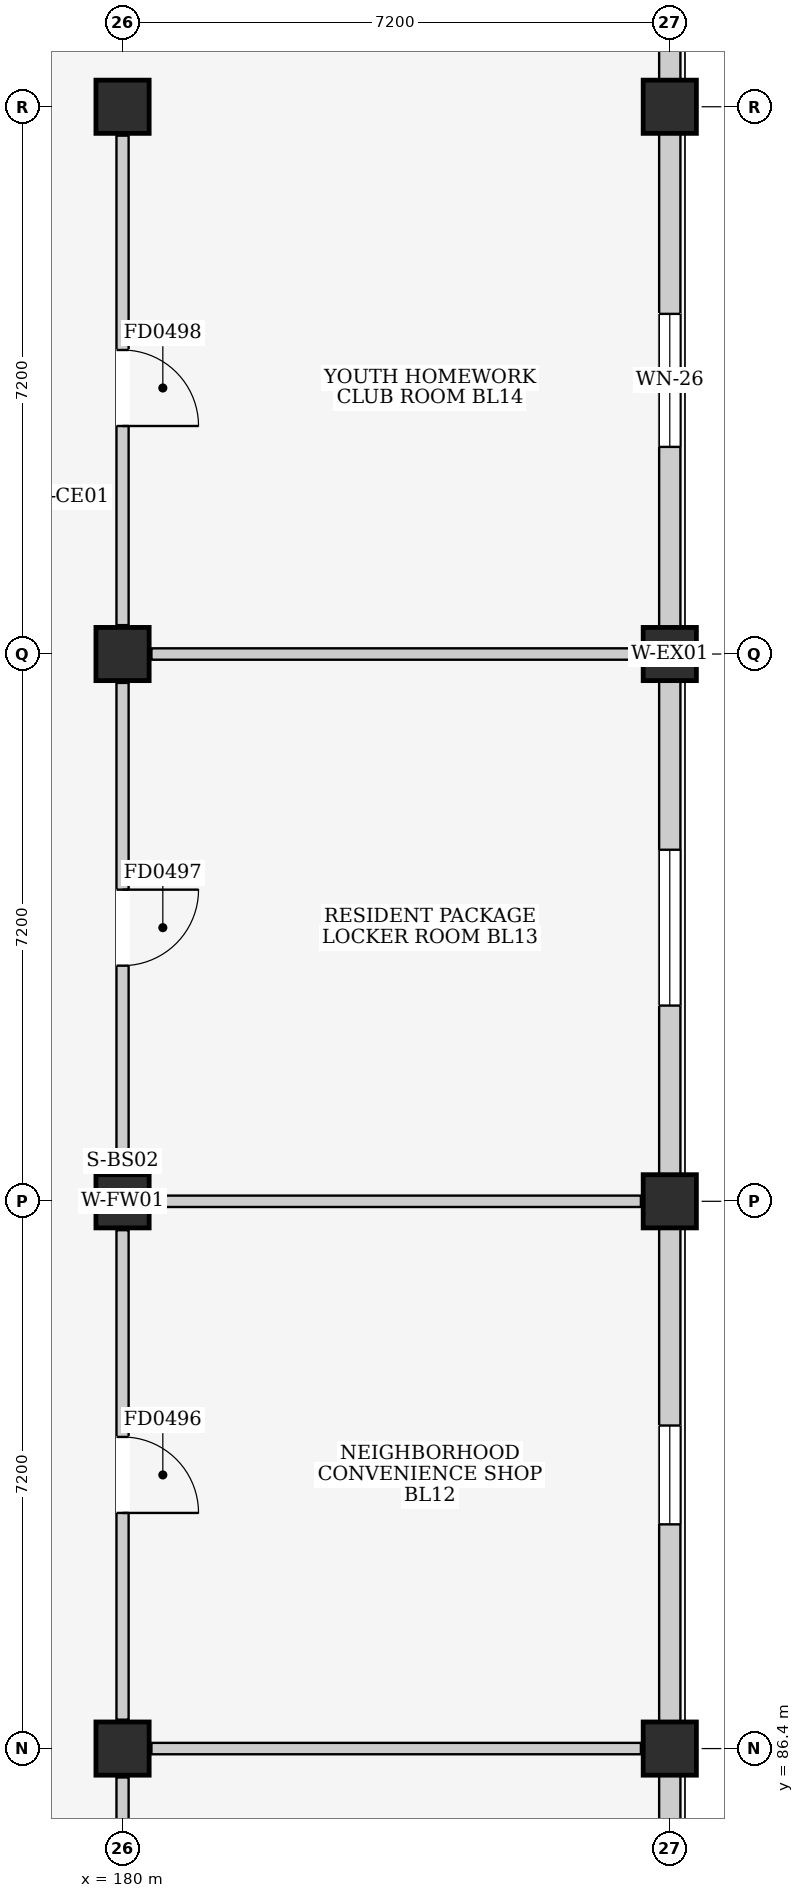
"""IFC4 building model, lengths in metres.
Left out: names, types, materials, properties, quantities, classifications, styles, units other than length and angle.
Written with IfcOpenShell. Run it as: python <this file> out.ifc"""

import sys

from ifc_helpers import new_model, si_unit, direction, frame, frame_2d, origin, origin_2d, place, context, subcontext, project, spatial, rectangle, extrude, element, fill, save


model = new_model("IFC4")
c1 = context("Model", 3, precision=1e-05, world=origin(), true_north=direction((0.0, 1.0)))
c2 = subcontext(c1, "Body", "Model", "MODEL_VIEW")
j1 = project(units=[si_unit("LENGTHUNIT", "METRE"), si_unit("PLANEANGLEUNIT", "RADIAN")], contexts=[c1])
p1 = place(None, origin())
s1 = spatial("IfcSite", under=j1, at=p1, CompositionType="ELEMENT")
p2 = place(p1, origin())
s2 = spatial("IfcBuilding", under=s1, at=p2, CompositionType="ELEMENT")
p3 = place(p2, origin())
s3 = spatial("IfcBuildingStorey", under=s2, at=p3, CompositionType="ELEMENT", Elevation=0.0)
for number, where, z_axis, x_axis in (
    (1, (180.0, 86.4, 0.0), (0.0, 0.0, 1.0), (1.0, 0.0, 0.0)),
    (2, (180.0, 93.6, 0.0), (0.0, 0.0, 1.0), (1.0, 0.0, 0.0)),
    (3, (180.0, 100.8, 0.0), (0.0, 0.0, 1.0), (1.0, 0.0, 0.0)),
    (4, (180.0, 108.0, 0.0), (0.0, 0.0, 1.0), (1.0, 0.0, 0.0)),
    (5, (187.2, 86.4, 0.0), (0.0, 0.0, 1.0), (1.0, 0.0, 0.0)),
    (6, (187.2, 93.6, 0.0), (0.0, 0.0, 1.0), (1.0, 0.0, 0.0)),
    (7, (187.2, 100.8, 0.0), (0.0, 0.0, 1.0), (1.0, 0.0, 0.0)),
    (8, (187.2, 108.0, 0.0), (0.0, 0.0, 1.0), (1.0, 0.0, 0.0)),
):
    element("IfcColumn", number, at=place(p3, frame(where, z_axis=z_axis, x_axis=x_axis)), inside=s3, PredefinedType="COLUMN", context=c2, shape_type="SweptSolid", body=[
        extrude(rectangle(XDim=0.7, YDim=0.7, at=origin_2d()), origin(), (0.0, 0.0, 1.0), 4.5),
    ])
p4 = place(p3, frame((187.2, 79.55, 0.0), z_axis=(0.0, 0.0, 1.0), x_axis=(0.0, 1.0, 0.0)))
e9 = element("IfcWall", 9, at=p4, inside=s3, PredefinedType="ELEMENTEDWALL", context=c2, shape_type="SweptSolid", body=[
    extrude(rectangle(XDim=6.5, YDim=0.28, at=frame_2d((3.25, 0.0))), origin(), (0.0, 0.0, 1.0), 3.665),
])
p5 = place(p4, frame((2.325, 0.0, 0.95)))
e10 = element("IfcOpeningElement", 10, at=p5, cuts=e9, PredefinedType="OPENING", context=c2, shape_type="SweptSolid", body=[
    extrude(rectangle(XDim=1.85, YDim=1.4, at=frame_2d((0.925, 0.7))), frame((0.0, 0.155, 0.0), z_axis=(0.0, -1.0, 0.0), x_axis=(1.0, 0.0, 0.0)), (0.0, 0.0, 1.0), 0.31),
])
p6 = place(p3, frame((187.2, 86.75, 0.0), z_axis=(0.0, 0.0, 1.0), x_axis=(0.0, 1.0, 0.0)))
e11 = element("IfcWall", 11, at=p6, inside=s3, PredefinedType="ELEMENTEDWALL", context=c2, shape_type="SweptSolid", body=[
    extrude(rectangle(XDim=6.5, YDim=0.28, at=frame_2d((3.25, 0.0))), origin(), (0.0, 0.0, 1.0), 3.665),
])
p7 = place(p6, frame((2.6, 0.0, 0.95)))
e12 = element("IfcOpeningElement", 12, at=p7, cuts=e11, PredefinedType="OPENING", context=c2, shape_type="SweptSolid", body=[
    extrude(rectangle(XDim=1.3, YDim=1.25, at=frame_2d((0.65, 0.625))), frame((0.0, 0.155, 0.0), z_axis=(0.0, -1.0, 0.0), x_axis=(1.0, 0.0, 0.0)), (0.0, 0.0, 1.0), 0.31),
])
p8 = place(p3, frame((187.2, 93.95, 0.0), z_axis=(0.0, 0.0, 1.0), x_axis=(0.0, 1.0, 0.0)))
e13 = element("IfcWall", 13, at=p8, inside=s3, PredefinedType="ELEMENTEDWALL", context=c2, shape_type="SweptSolid", body=[
    extrude(rectangle(XDim=6.5, YDim=0.28, at=frame_2d((3.25, 0.0))), origin(), (0.0, 0.0, 1.0), 3.665),
])
p9 = place(p8, frame((2.225, 0.0, 0.95)))
e14 = element("IfcOpeningElement", 14, at=p9, cuts=e13, PredefinedType="OPENING", context=c2, shape_type="SweptSolid", body=[
    extrude(rectangle(XDim=2.05, YDim=1.6, at=frame_2d((1.025, 0.8))), frame((0.0, 0.155, 0.0), z_axis=(0.0, -1.0, 0.0), x_axis=(1.0, 0.0, 0.0)), (0.0, 0.0, 1.0), 0.31),
])
p10 = place(p3, frame((187.2, 101.15, 0.0), z_axis=(0.0, 0.0, 1.0), x_axis=(0.0, 1.0, 0.0)))
e15 = element("IfcWall", 15, at=p10, inside=s3, PredefinedType="ELEMENTEDWALL", context=c2, shape_type="SweptSolid", body=[
    extrude(rectangle(XDim=6.5, YDim=0.28, at=frame_2d((3.25, 0.0))), origin(), (0.0, 0.0, 1.0), 3.665),
])
p11 = place(p10, frame((2.375, 0.0, 0.95)))
e16 = element("IfcOpeningElement", 16, at=p11, cuts=e15, PredefinedType="OPENING", context=c2, shape_type="SweptSolid", body=[
    extrude(rectangle(XDim=1.75, YDim=1.55, at=frame_2d((0.875, 0.775))), frame((0.0, 0.155, 0.0), z_axis=(0.0, -1.0, 0.0), x_axis=(1.0, 0.0, 0.0)), (0.0, 0.0, 1.0), 0.31),
])
p12 = place(p3, frame((187.2, 108.35, 0.0), z_axis=(0.0, 0.0, 1.0), x_axis=(0.0, 1.0, 0.0)))
e17 = element("IfcWall", 17, at=p12, inside=s3, PredefinedType="ELEMENTEDWALL", context=c2, shape_type="SweptSolid", body=[
    extrude(rectangle(XDim=6.5, YDim=0.28, at=frame_2d((3.25, 0.0))), origin(), (0.0, 0.0, 1.0), 3.665),
])
p13 = place(p12, frame((2.35, 0.0, 0.95)))
e18 = element("IfcOpeningElement", 18, at=p13, cuts=e17, PredefinedType="OPENING", context=c2, shape_type="SweptSolid", body=[
    extrude(rectangle(XDim=1.8, YDim=1.5, at=frame_2d((0.9, 0.75))), frame((0.0, 0.155, 0.0), z_axis=(0.0, -1.0, 0.0), x_axis=(1.0, 0.0, 0.0)), (0.0, 0.0, 1.0), 0.31),
])
p14 = place(p3, frame((180.0, 79.58, 0.0), z_axis=(0.0, 0.0, 1.0), x_axis=(0.0, 1.0, 0.0)))
e19 = element("IfcWall", 19, at=p14, inside=s3, PredefinedType="PARTITIONING", context=c2, shape_type="SweptSolid", body=[
    extrude(rectangle(XDim=6.44, YDim=0.16, at=frame_2d((3.22, 0.0))), origin(), (0.0, 0.0, 1.0), 3.435),
])
p15 = place(p14, frame((2.82, 0.0, 0.0)))
e20 = element("IfcOpeningElement", 20, at=p15, cuts=e19, PredefinedType="OPENING", context=c2, shape_type="SweptSolid", body=[
    extrude(rectangle(XDim=1.0, YDim=2.15, at=frame_2d((0.5, 1.075))), frame((0.0, 0.095, 0.0), z_axis=(0.0, -1.0, 0.0), x_axis=(1.0, 0.0, 0.0)), (0.0, 0.0, 1.0), 0.19),
])
p16 = place(p3, frame((180.38, 86.4, 0.0), z_axis=(0.0, 0.0, 1.0), x_axis=(1.0, 0.0, 0.0)))
e21 = element("IfcWall", 21, at=p16, inside=s3, PredefinedType="PARTITIONING", context=c2, shape_type="SweptSolid", body=[
    extrude(rectangle(XDim=6.44, YDim=0.15, at=frame_2d((3.22, 0.0))), origin(), (0.0, 0.0, 1.0), 3.435),
])
p17 = place(p3, frame((180.0, 86.78, 0.0), z_axis=(0.0, 0.0, 1.0), x_axis=(0.0, 1.0, 0.0)))
e22 = element("IfcWall", 22, at=p17, inside=s3, PredefinedType="PARTITIONING", context=c2, shape_type="SweptSolid", body=[
    extrude(rectangle(XDim=6.44, YDim=0.16, at=frame_2d((3.22, 0.0))), origin(), (0.0, 0.0, 1.0), 3.435),
])
p18 = place(p17, frame((2.72, 0.0, 0.0)))
e23 = element("IfcOpeningElement", 23, at=p18, cuts=e22, PredefinedType="OPENING", context=c2, shape_type="SweptSolid", body=[
    extrude(rectangle(XDim=1.0, YDim=2.15, at=frame_2d((0.5, 1.075))), frame((0.0, 0.095, 0.0), z_axis=(0.0, -1.0, 0.0), x_axis=(1.0, 0.0, 0.0)), (0.0, 0.0, 1.0), 0.19),
])
p19 = place(p3, frame((180.38, 93.6, 0.0), z_axis=(0.0, 0.0, 1.0), x_axis=(1.0, 0.0, 0.0)))
e24 = element("IfcWall", 24, at=p19, inside=s3, PredefinedType="PARTITIONING", context=c2, shape_type="SweptSolid", body=[
    extrude(rectangle(XDim=6.44, YDim=0.15, at=frame_2d((3.22, 0.0))), origin(), (0.0, 0.0, 1.0), 3.435),
])
p20 = place(p3, frame((180.0, 93.98, 0.0), z_axis=(0.0, 0.0, 1.0), x_axis=(0.0, 1.0, 0.0)))
e25 = element("IfcWall", 25, at=p20, inside=s3, PredefinedType="PARTITIONING", context=c2, shape_type="SweptSolid", body=[
    extrude(rectangle(XDim=6.44, YDim=0.16, at=frame_2d((3.22, 0.0))), origin(), (0.0, 0.0, 1.0), 3.435),
])
p21 = place(p20, frame((2.72, 0.0, 0.0)))
e26 = element("IfcOpeningElement", 26, at=p21, cuts=e25, PredefinedType="OPENING", context=c2, shape_type="SweptSolid", body=[
    extrude(rectangle(XDim=1.0, YDim=2.15, at=frame_2d((0.5, 1.075))), frame((0.0, 0.095, 0.0), z_axis=(0.0, -1.0, 0.0), x_axis=(1.0, 0.0, 0.0)), (0.0, 0.0, 1.0), 0.19),
])
p22 = place(p3, frame((180.38, 100.8, 0.0), z_axis=(0.0, 0.0, 1.0), x_axis=(1.0, 0.0, 0.0)))
e27 = element("IfcWall", 27, at=p22, inside=s3, PredefinedType="PARTITIONING", context=c2, shape_type="SweptSolid", body=[
    extrude(rectangle(XDim=6.44, YDim=0.15, at=frame_2d((3.22, 0.0))), origin(), (0.0, 0.0, 1.0), 3.435),
])
p23 = place(p3, frame((180.0, 101.18, 0.0), z_axis=(0.0, 0.0, 1.0), x_axis=(0.0, 1.0, 0.0)))
e28 = element("IfcWall", 28, at=p23, inside=s3, PredefinedType="PARTITIONING", context=c2, shape_type="SweptSolid", body=[
    extrude(rectangle(XDim=6.44, YDim=0.16, at=frame_2d((3.22, 0.0))), origin(), (0.0, 0.0, 1.0), 3.435),
])
p24 = place(p23, frame((2.62, 0.0, 0.0)))
e29 = element("IfcOpeningElement", 29, at=p24, cuts=e28, PredefinedType="OPENING", context=c2, shape_type="SweptSolid", body=[
    extrude(rectangle(XDim=1.0, YDim=2.15, at=frame_2d((0.5, 1.075))), frame((0.0, 0.095, 0.0), z_axis=(0.0, -1.0, 0.0), x_axis=(1.0, 0.0, 0.0)), (0.0, 0.0, 1.0), 0.19),
])
p25 = place(p7, origin())
e30 = element("IfcWindow", 30, at=p25, inside=s3, PartitioningType="SINGLE_PANEL", PredefinedType="WINDOW", context=c2, shape_type="SweptSolid", body=[
    extrude(rectangle(XDim=1.3, YDim=1.25, at=frame_2d((0.65, 0.625))), frame((0.0, 0.03, 0.0), z_axis=(0.0, -1.0, 0.0), x_axis=(1.0, 0.0, 0.0)), (0.0, 0.0, 1.0), 0.06),
])
fill(e12, e30)
p26 = place(p9, origin())
e31 = element("IfcWindow", 31, at=p26, inside=s3, PartitioningType="DOUBLE_PANEL_VERTICAL", PredefinedType="WINDOW", context=c2, shape_type="SweptSolid", body=[
    extrude(rectangle(XDim=2.05, YDim=1.6, at=frame_2d((1.025, 0.8))), frame((0.0, 0.03, 0.0), z_axis=(0.0, -1.0, 0.0), x_axis=(1.0, 0.0, 0.0)), (0.0, 0.0, 1.0), 0.06),
])
fill(e14, e31)
p27 = place(p11, origin())
e32 = element("IfcWindow", 32, at=p27, inside=s3, PartitioningType="DOUBLE_PANEL_VERTICAL", PredefinedType="WINDOW", context=c2, shape_type="SweptSolid", body=[
    extrude(rectangle(XDim=1.75, YDim=1.55, at=frame_2d((0.875, 0.775))), frame((0.0, 0.03, 0.0), z_axis=(0.0, -1.0, 0.0), x_axis=(1.0, 0.0, 0.0)), (0.0, 0.0, 1.0), 0.06),
])
fill(e16, e32)
p28 = place(p18, frame((1.0, 0.0, 0.0), z_axis=(0.0, 0.0, 1.0), x_axis=(-1.0, 0.0, 0.0)))
e33 = element("IfcDoor", 33, at=p28, inside=s3, OperationType="SINGLE_SWING_RIGHT", PredefinedType="DOOR", context=c2, shape_type="SweptSolid", body=[
    extrude(rectangle(XDim=1.0, YDim=2.15, at=frame_2d((0.5, 1.075))), frame((0.0, 0.025, 0.0), z_axis=(0.0, -1.0, 0.0), x_axis=(1.0, 0.0, 0.0)), (0.0, 0.0, 1.0), 0.05),
])
fill(e23, e33)
p29 = place(p21, frame((1.0, 0.0, 0.0), z_axis=(0.0, 0.0, 1.0), x_axis=(-1.0, 0.0, 0.0)))
e34 = element("IfcDoor", 34, at=p29, inside=s3, OperationType="SINGLE_SWING_LEFT", PredefinedType="DOOR", context=c2, shape_type="SweptSolid", body=[
    extrude(rectangle(XDim=1.0, YDim=2.15, at=frame_2d((0.5, 1.075))), frame((0.0, 0.025, 0.0), z_axis=(0.0, -1.0, 0.0), x_axis=(1.0, 0.0, 0.0)), (0.0, 0.0, 1.0), 0.05),
])
fill(e26, e34)
p30 = place(p24, frame((1.0, 0.0, 0.0), z_axis=(0.0, 0.0, 1.0), x_axis=(-1.0, 0.0, 0.0)))
e35 = element("IfcDoor", 35, at=p30, inside=s3, OperationType="SINGLE_SWING_RIGHT", PredefinedType="DOOR", context=c2, shape_type="SweptSolid", body=[
    extrude(rectangle(XDim=1.0, YDim=2.15, at=frame_2d((0.5, 1.075))), frame((0.0, 0.025, 0.0), z_axis=(0.0, -1.0, 0.0), x_axis=(1.0, 0.0, 0.0)), (0.0, 0.0, 1.0), 0.05),
])
fill(e29, e35)
save(model, sys.argv[1])
